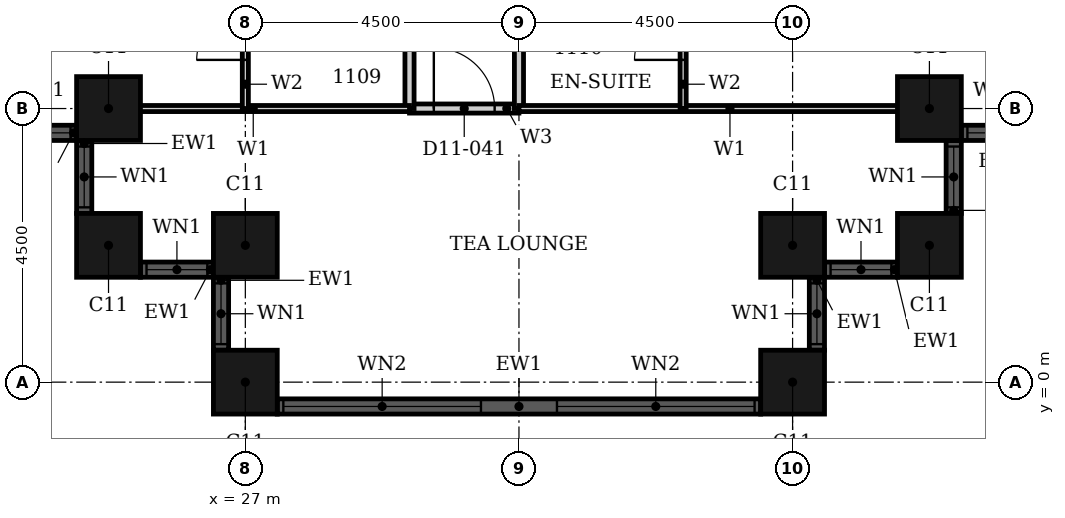
"""IFC4 building model, lengths in metres.
Left out: names, types, materials, properties, quantities, classifications, styles, units other than length and angle.
Written with IfcOpenShell. Run it as: python <this file> out.ifc"""

import sys

from ifc_helpers import new_model, si_unit, direction, frame, frame_2d, origin, origin_2d, place, context, subcontext, project, spatial, rectangle, hollow_rectangle, extrude, element, fill, save


model = new_model("IFC4")
c1 = context("Model", 3, precision=1e-05, world=origin(), true_north=direction((0.0, 1.0)))
c2 = subcontext(c1, "Body", "Model", "MODEL_VIEW")
j1 = project(units=[si_unit("LENGTHUNIT", "METRE"), si_unit("PLANEANGLEUNIT", "RADIAN")], contexts=[c1])
p1 = place(None, origin())
s1 = spatial("IfcSite", under=j1, at=p1, CompositionType="ELEMENT")
p2 = place(p1, origin())
s2 = spatial("IfcBuilding", under=s1, at=p2, CompositionType="ELEMENT")
p3 = place(p2, frame((0.0, 0.0, 52.8)))
s3 = spatial("IfcBuildingStorey", under=s2, at=p3, CompositionType="ELEMENT", Elevation=52.8)
for number, where, z_axis, x_axis in (
    (1, (24.75, 4.5, 0.0), (0.0, 0.0, 1.0), (1.0, 0.0, 0.0)),
    (2, (24.75, 2.25, 0.0), (0.0, 0.0, 1.0), (1.0, 0.0, 0.0)),
    (3, (27.0, 2.25, 0.0), (0.0, 0.0, 1.0), (1.0, 0.0, 0.0)),
    (4, (27.0, 0.0, 0.0), (0.0, 0.0, 1.0), (1.0, 0.0, 0.0)),
    (5, (36.0, 0.0, 0.0), (0.0, 0.0, 1.0), (1.0, 0.0, 0.0)),
    (6, (36.0, 2.25, 0.0), (0.0, 0.0, 1.0), (1.0, 0.0, 0.0)),
    (7, (38.25, 2.25, 0.0), (0.0, 0.0, 1.0), (1.0, 0.0, 0.0)),
    (8, (38.25, 4.5, 0.0), (0.0, 0.0, 1.0), (1.0, 0.0, 0.0)),
):
    element("IfcColumn", number, at=place(p3, frame(where, z_axis=z_axis, x_axis=x_axis)), inside=s3, PredefinedType="COLUMN", context=c2, shape_type="SweptSolid", body=[
        extrude(hollow_rectangle(XDim=1.05, YDim=1.05, WallThickness=0.034, at=origin_2d()), origin(), (0.0, 0.0, 1.0), 3.6),
    ])
p4 = place(p3, frame((23.025, 4.1, 0.0), z_axis=(0.0, 0.0, 1.0), x_axis=(1.0, 0.0, 0.0)))
e9 = element("IfcWall", 9, at=p4, inside=s3, PredefinedType="SOLIDWALL", context=c2, shape_type="SweptSolid", body=[
    extrude(rectangle(XDim=1.2, YDim=0.25, at=frame_2d((0.6, 0.0))), origin(), (0.0, 0.0, 1.0), 3.6),
])
p5 = place(p4, frame((0.1, 0.0, 0.9)))
e10 = element("IfcOpeningElement", 10, at=p5, cuts=e9, PredefinedType="OPENING", context=c2, shape_type="SweptSolid", body=[
    extrude(rectangle(XDim=1.0, YDim=2.08, at=frame_2d((0.5, 1.04))), frame((0.0, 0.135, 0.0), z_axis=(0.0, -1.0, 0.0), x_axis=(1.0, 0.0, 0.0)), (0.0, 0.0, 1.0), 0.27),
])
p6 = place(p3, frame((24.35, 3.975, 0.0), z_axis=(0.0, 0.0, 1.0), x_axis=(0.0, -1.0, 0.0)))
e11 = element("IfcWall", 11, at=p6, inside=s3, PredefinedType="SOLIDWALL", context=c2, shape_type="SweptSolid", body=[
    extrude(rectangle(XDim=1.2, YDim=0.25, at=frame_2d((0.6, 0.0))), origin(), (0.0, 0.0, 1.0), 3.6),
])
p7 = place(p6, frame((0.1, 0.0, 0.9)))
e12 = element("IfcOpeningElement", 12, at=p7, cuts=e11, PredefinedType="OPENING", context=c2, shape_type="SweptSolid", body=[
    extrude(rectangle(XDim=1.0, YDim=2.08, at=frame_2d((0.5, 1.04))), frame((0.0, 0.135, 0.0), z_axis=(0.0, -1.0, 0.0), x_axis=(1.0, 0.0, 0.0)), (0.0, 0.0, 1.0), 0.27),
])
p8 = place(p3, frame((25.275, 1.85, 0.0), z_axis=(0.0, 0.0, 1.0), x_axis=(1.0, 0.0, 0.0)))
e13 = element("IfcWall", 13, at=p8, inside=s3, PredefinedType="SOLIDWALL", context=c2, shape_type="SweptSolid", body=[
    extrude(rectangle(XDim=1.2, YDim=0.25, at=frame_2d((0.6, 0.0))), origin(), (0.0, 0.0, 1.0), 3.6),
])
p9 = place(p8, frame((0.1, 0.0, 0.9)))
e14 = element("IfcOpeningElement", 14, at=p9, cuts=e13, PredefinedType="OPENING", context=c2, shape_type="SweptSolid", body=[
    extrude(rectangle(XDim=1.0, YDim=2.08, at=frame_2d((0.5, 1.04))), frame((0.0, 0.135, 0.0), z_axis=(0.0, -1.0, 0.0), x_axis=(1.0, 0.0, 0.0)), (0.0, 0.0, 1.0), 0.27),
])
p10 = place(p3, frame((26.6, 1.725, 0.0), z_axis=(0.0, 0.0, 1.0), x_axis=(0.0, -1.0, 0.0)))
e15 = element("IfcWall", 15, at=p10, inside=s3, PredefinedType="SOLIDWALL", context=c2, shape_type="SweptSolid", body=[
    extrude(rectangle(XDim=1.2, YDim=0.25, at=frame_2d((0.6, 0.0))), origin(), (0.0, 0.0, 1.0), 3.6),
])
p11 = place(p10, frame((0.1, 0.0, 0.9)))
e16 = element("IfcOpeningElement", 16, at=p11, cuts=e15, PredefinedType="OPENING", context=c2, shape_type="SweptSolid", body=[
    extrude(rectangle(XDim=1.0, YDim=2.08, at=frame_2d((0.5, 1.04))), frame((0.0, 0.135, 0.0), z_axis=(0.0, -1.0, 0.0), x_axis=(1.0, 0.0, 0.0)), (0.0, 0.0, 1.0), 0.27),
])
p12 = place(p3, frame((27.525, -0.4, 0.0), z_axis=(0.0, 0.0, 1.0), x_axis=(1.0, 0.0, 0.0)))
e17 = element("IfcWall", 17, at=p12, inside=s3, PredefinedType="SOLIDWALL", context=c2, shape_type="SweptSolid", body=[
    extrude(rectangle(XDim=7.95, YDim=0.25, at=frame_2d((3.975, 0.0))), origin(), (0.0, 0.0, 1.0), 3.6),
])
p13 = place(p12, frame((0.1, 0.0, 0.9)))
e18 = element("IfcOpeningElement", 18, at=p13, cuts=e17, PredefinedType="OPENING", context=c2, shape_type="SweptSolid", body=[
    extrude(rectangle(XDim=3.25, YDim=2.08, at=frame_2d((1.625, 1.04))), frame((0.0, 0.135, 0.0), z_axis=(0.0, -1.0, 0.0), x_axis=(1.0, 0.0, 0.0)), (0.0, 0.0, 1.0), 0.27),
])
p14 = place(p12, frame((4.6, 0.0, 0.9)))
e19 = element("IfcOpeningElement", 19, at=p14, cuts=e17, PredefinedType="OPENING", context=c2, shape_type="SweptSolid", body=[
    extrude(rectangle(XDim=3.25, YDim=2.08, at=frame_2d((1.625, 1.04))), frame((0.0, 0.135, 0.0), z_axis=(0.0, -1.0, 0.0), x_axis=(1.0, 0.0, 0.0)), (0.0, 0.0, 1.0), 0.27),
])
p15 = place(p3, frame((36.4, 0.525, 0.0), z_axis=(0.0, 0.0, 1.0), x_axis=(0.0, 1.0, 0.0)))
e20 = element("IfcWall", 20, at=p15, inside=s3, PredefinedType="SOLIDWALL", context=c2, shape_type="SweptSolid", body=[
    extrude(rectangle(XDim=1.2, YDim=0.25, at=frame_2d((0.6, 0.0))), origin(), (0.0, 0.0, 1.0), 3.6),
])
p16 = place(p15, frame((0.1, 0.0, 0.9)))
e21 = element("IfcOpeningElement", 21, at=p16, cuts=e20, PredefinedType="OPENING", context=c2, shape_type="SweptSolid", body=[
    extrude(rectangle(XDim=1.0, YDim=2.08, at=frame_2d((0.5, 1.04))), frame((0.0, 0.135, 0.0), z_axis=(0.0, -1.0, 0.0), x_axis=(1.0, 0.0, 0.0)), (0.0, 0.0, 1.0), 0.27),
])
p17 = place(p3, frame((36.525, 1.85, 0.0), z_axis=(0.0, 0.0, 1.0), x_axis=(1.0, 0.0, 0.0)))
e22 = element("IfcWall", 22, at=p17, inside=s3, PredefinedType="SOLIDWALL", context=c2, shape_type="SweptSolid", body=[
    extrude(rectangle(XDim=1.2, YDim=0.25, at=frame_2d((0.6, 0.0))), origin(), (0.0, 0.0, 1.0), 3.6),
])
p18 = place(p17, frame((0.1, 0.0, 0.9)))
e23 = element("IfcOpeningElement", 23, at=p18, cuts=e22, PredefinedType="OPENING", context=c2, shape_type="SweptSolid", body=[
    extrude(rectangle(XDim=1.0, YDim=2.08, at=frame_2d((0.5, 1.04))), frame((0.0, 0.135, 0.0), z_axis=(0.0, -1.0, 0.0), x_axis=(1.0, 0.0, 0.0)), (0.0, 0.0, 1.0), 0.27),
])
p19 = place(p3, frame((38.65, 2.775, 0.0), z_axis=(0.0, 0.0, 1.0), x_axis=(0.0, 1.0, 0.0)))
e24 = element("IfcWall", 24, at=p19, inside=s3, PredefinedType="SOLIDWALL", context=c2, shape_type="SweptSolid", body=[
    extrude(rectangle(XDim=1.2, YDim=0.25, at=frame_2d((0.6, 0.0))), origin(), (0.0, 0.0, 1.0), 3.6),
])
p20 = place(p19, frame((0.1, 0.0, 0.9)))
e25 = element("IfcOpeningElement", 25, at=p20, cuts=e24, PredefinedType="OPENING", context=c2, shape_type="SweptSolid", body=[
    extrude(rectangle(XDim=1.0, YDim=2.08, at=frame_2d((0.5, 1.04))), frame((0.0, 0.135, 0.0), z_axis=(0.0, -1.0, 0.0), x_axis=(1.0, 0.0, 0.0)), (0.0, 0.0, 1.0), 0.27),
])
p21 = place(p3, frame((38.775, 4.1, 0.0), z_axis=(0.0, 0.0, 1.0), x_axis=(1.0, 0.0, 0.0)))
e26 = element("IfcWall", 26, at=p21, inside=s3, PredefinedType="SOLIDWALL", context=c2, shape_type="SweptSolid", body=[
    extrude(rectangle(XDim=1.2, YDim=0.25, at=frame_2d((0.6, 0.0))), origin(), (0.0, 0.0, 1.0), 3.6),
])
p22 = place(p21, frame((0.1, 0.0, 0.9)))
e27 = element("IfcOpeningElement", 27, at=p22, cuts=e26, PredefinedType="OPENING", context=c2, shape_type="SweptSolid", body=[
    extrude(rectangle(XDim=1.0, YDim=2.08, at=frame_2d((0.5, 1.04))), frame((0.0, 0.135, 0.0), z_axis=(0.0, -1.0, 0.0), x_axis=(1.0, 0.0, 0.0)), (0.0, 0.0, 1.0), 0.27),
])
p23 = place(p3, frame((29.7, 4.5, 0.0), z_axis=(0.0, 0.0, 1.0), x_axis=(1.0, 0.0, 0.0)))
e28 = element("IfcWall", 28, at=p23, inside=s3, PredefinedType="PARTITIONING", context=c2, shape_type="SweptSolid", body=[
    extrude(rectangle(XDim=1.8, YDim=0.15, at=frame_2d((0.9, 0.0))), origin(), (0.0, 0.0, 1.0), 3.3),
])
p24 = place(p23, frame((0.4, 0.0, 0.0)))
e29 = element("IfcOpeningElement", 29, at=p24, cuts=e28, PredefinedType="OPENING", context=c2, shape_type="SweptSolid", body=[
    extrude(rectangle(XDim=1.0, YDim=2.1, at=frame_2d((0.5, 1.05))), frame((0.0, 0.085, 0.0), z_axis=(0.0, -1.0, 0.0), x_axis=(1.0, 0.0, 0.0)), (0.0, 0.0, 1.0), 0.17),
])
p25 = place(p3, frame((29.7, 4.5, 0.0), z_axis=(0.0, 0.0, 1.0), x_axis=(0.0, 1.0, 0.0)))
e30 = element("IfcWall", 30, at=p25, inside=s3, PredefinedType="PARTITIONING", context=c2, shape_type="SweptSolid", body=[
    extrude(rectangle(XDim=16.2, YDim=0.15, at=frame_2d((8.1, 0.0))), origin(), (0.0, 0.0, 1.0), 3.3),
])
p26 = place(p25, frame((7.45, 0.0, 0.0)))
e31 = element("IfcOpeningElement", 31, at=p26, cuts=e30, PredefinedType="OPENING", context=c2, shape_type="SweptSolid", body=[
    extrude(rectangle(XDim=1.0, YDim=2.1, at=frame_2d((0.5, 1.05))), frame((0.0, 0.085, 0.0), z_axis=(0.0, -1.0, 0.0), x_axis=(1.0, 0.0, 0.0)), (0.0, 0.0, 1.0), 0.17),
])
p27 = place(p25, frame((2.95, 0.0, 0.0)))
e32 = element("IfcOpeningElement", 32, at=p27, cuts=e30, PredefinedType="OPENING", context=c2, shape_type="SweptSolid", body=[
    extrude(rectangle(XDim=1.0, YDim=2.1, at=frame_2d((0.5, 1.05))), frame((0.0, 0.085, 0.0), z_axis=(0.0, -1.0, 0.0), x_axis=(1.0, 0.0, 0.0)), (0.0, 0.0, 1.0), 0.17),
])
p28 = place(p3, frame((31.5, 4.5, 0.0), z_axis=(0.0, 0.0, 1.0), x_axis=(0.0, 1.0, 0.0)))
e33 = element("IfcWall", 33, at=p28, inside=s3, PredefinedType="PARTITIONING", context=c2, shape_type="SweptSolid", body=[
    extrude(rectangle(XDim=16.2, YDim=0.15, at=frame_2d((8.1, 0.0))), origin(), (0.0, 0.0, 1.0), 2.58),
])
p29 = place(p28, frame((6.25, 0.0, 0.0)))
e34 = element("IfcOpeningElement", 34, at=p29, cuts=e33, PredefinedType="OPENING", context=c2, shape_type="SweptSolid", body=[
    extrude(rectangle(XDim=1.0, YDim=2.1, at=frame_2d((0.5, 1.05))), frame((0.0, 0.085, 0.0), z_axis=(0.0, -1.0, 0.0), x_axis=(1.0, 0.0, 0.0)), (0.0, 0.0, 1.0), 0.17),
])
p30 = place(p3, frame((24.56, 4.5, 0.0), z_axis=(0.0, 0.0, 1.0), x_axis=(1.0, 0.0, 0.0)))
e35 = element("IfcWall", 35, at=p30, inside=s3, PredefinedType="PARTITIONING", context=c2, shape_type="SweptSolid", body=[
    extrude(rectangle(XDim=5.14, YDim=0.1, at=frame_2d((2.57, 0.0))), origin(), (0.0, 0.0, 1.0), 3.3),
])
p31 = place(p3, frame((31.5, 4.5, 0.0), z_axis=(0.0, 0.0, 1.0), x_axis=(1.0, 0.0, 0.0)))
e36 = element("IfcWall", 36, at=p31, inside=s3, PredefinedType="PARTITIONING", context=c2, shape_type="SweptSolid", body=[
    extrude(rectangle(XDim=6.94, YDim=0.1, at=frame_2d((3.47, 0.0))), origin(), (0.0, 0.0, 1.0), 3.3),
])
p32 = place(p3, frame((27.0, 4.5, 0.0), z_axis=(0.0, 0.0, 1.0), x_axis=(0.0, 1.0, 0.0)))
e37 = element("IfcWall", 37, at=p32, inside=s3, PredefinedType="PARTITIONING", context=c2, shape_type="SweptSolid", body=[
    extrude(rectangle(XDim=2.4, YDim=0.1, at=frame_2d((1.2, 0.0))), origin(), (0.0, 0.0, 1.0), 2.58),
])
p33 = place(p32, frame((0.8, 0.0, 0.0)))
e38 = element("IfcOpeningElement", 38, at=p33, cuts=e37, PredefinedType="OPENING", context=c2, shape_type="SweptSolid", body=[
    extrude(rectangle(XDim=0.8, YDim=2.1, at=frame_2d((0.4, 1.05))), frame((0.0, 0.06, 0.0), z_axis=(0.0, -1.0, 0.0), x_axis=(1.0, 0.0, 0.0)), (0.0, 0.0, 1.0), 0.12),
])
p34 = place(p3, frame((34.2, 4.5, 0.0), z_axis=(0.0, 0.0, 1.0), x_axis=(0.0, 1.0, 0.0)))
e39 = element("IfcWall", 39, at=p34, inside=s3, PredefinedType="PARTITIONING", context=c2, shape_type="SweptSolid", body=[
    extrude(rectangle(XDim=2.4, YDim=0.1, at=frame_2d((1.2, 0.0))), origin(), (0.0, 0.0, 1.0), 3.3),
])
p35 = place(p34, frame((0.8, 0.0, 0.0)))
e40 = element("IfcOpeningElement", 40, at=p35, cuts=e39, PredefinedType="OPENING", context=c2, shape_type="SweptSolid", body=[
    extrude(rectangle(XDim=0.8, YDim=2.1, at=frame_2d((0.4, 1.05))), frame((0.0, 0.06, 0.0), z_axis=(0.0, -1.0, 0.0), x_axis=(1.0, 0.0, 0.0)), (0.0, 0.0, 1.0), 0.12),
])
p36 = place(p5, origin())
e41 = element("IfcWindow", 41, at=p36, inside=s3, PartitioningType="SINGLE_PANEL", PredefinedType="WINDOW", context=c2, shape_type="SweptSolid", body=[
    extrude(rectangle(XDim=1.0, YDim=2.08, at=frame_2d((0.5, 1.04))), frame((0.0, 0.03, 0.0), z_axis=(0.0, -1.0, 0.0), x_axis=(1.0, 0.0, 0.0)), (0.0, 0.0, 1.0), 0.06),
])
fill(e10, e41)
p37 = place(p7, origin())
e42 = element("IfcWindow", 42, at=p37, inside=s3, PartitioningType="SINGLE_PANEL", PredefinedType="WINDOW", context=c2, shape_type="SweptSolid", body=[
    extrude(rectangle(XDim=1.0, YDim=2.08, at=frame_2d((0.5, 1.04))), frame((0.0, 0.03, 0.0), z_axis=(0.0, -1.0, 0.0), x_axis=(1.0, 0.0, 0.0)), (0.0, 0.0, 1.0), 0.06),
])
fill(e12, e42)
p38 = place(p9, origin())
e43 = element("IfcWindow", 43, at=p38, inside=s3, PartitioningType="SINGLE_PANEL", PredefinedType="WINDOW", context=c2, shape_type="SweptSolid", body=[
    extrude(rectangle(XDim=1.0, YDim=2.08, at=frame_2d((0.5, 1.04))), frame((0.0, 0.03, 0.0), z_axis=(0.0, -1.0, 0.0), x_axis=(1.0, 0.0, 0.0)), (0.0, 0.0, 1.0), 0.06),
])
fill(e14, e43)
p39 = place(p11, origin())
e44 = element("IfcWindow", 44, at=p39, inside=s3, PartitioningType="SINGLE_PANEL", PredefinedType="WINDOW", context=c2, shape_type="SweptSolid", body=[
    extrude(rectangle(XDim=1.0, YDim=2.08, at=frame_2d((0.5, 1.04))), frame((0.0, 0.03, 0.0), z_axis=(0.0, -1.0, 0.0), x_axis=(1.0, 0.0, 0.0)), (0.0, 0.0, 1.0), 0.06),
])
fill(e16, e44)
p40 = place(p13, origin())
e45 = element("IfcWindow", 45, at=p40, inside=s3, PartitioningType="SINGLE_PANEL", PredefinedType="WINDOW", context=c2, shape_type="SweptSolid", body=[
    extrude(rectangle(XDim=3.25, YDim=2.08, at=frame_2d((1.625, 1.04))), frame((0.0, 0.03, 0.0), z_axis=(0.0, -1.0, 0.0), x_axis=(1.0, 0.0, 0.0)), (0.0, 0.0, 1.0), 0.06),
])
fill(e18, e45)
p41 = place(p14, origin())
e46 = element("IfcWindow", 46, at=p41, inside=s3, PartitioningType="SINGLE_PANEL", PredefinedType="WINDOW", context=c2, shape_type="SweptSolid", body=[
    extrude(rectangle(XDim=3.25, YDim=2.08, at=frame_2d((1.625, 1.04))), frame((0.0, 0.03, 0.0), z_axis=(0.0, -1.0, 0.0), x_axis=(1.0, 0.0, 0.0)), (0.0, 0.0, 1.0), 0.06),
])
fill(e19, e46)
p42 = place(p16, origin())
e47 = element("IfcWindow", 47, at=p42, inside=s3, PartitioningType="SINGLE_PANEL", PredefinedType="WINDOW", context=c2, shape_type="SweptSolid", body=[
    extrude(rectangle(XDim=1.0, YDim=2.08, at=frame_2d((0.5, 1.04))), frame((0.0, 0.03, 0.0), z_axis=(0.0, -1.0, 0.0), x_axis=(1.0, 0.0, 0.0)), (0.0, 0.0, 1.0), 0.06),
])
fill(e21, e47)
p43 = place(p18, origin())
e48 = element("IfcWindow", 48, at=p43, inside=s3, PartitioningType="SINGLE_PANEL", PredefinedType="WINDOW", context=c2, shape_type="SweptSolid", body=[
    extrude(rectangle(XDim=1.0, YDim=2.08, at=frame_2d((0.5, 1.04))), frame((0.0, 0.03, 0.0), z_axis=(0.0, -1.0, 0.0), x_axis=(1.0, 0.0, 0.0)), (0.0, 0.0, 1.0), 0.06),
])
fill(e23, e48)
p44 = place(p20, origin())
e49 = element("IfcWindow", 49, at=p44, inside=s3, PartitioningType="SINGLE_PANEL", PredefinedType="WINDOW", context=c2, shape_type="SweptSolid", body=[
    extrude(rectangle(XDim=1.0, YDim=2.08, at=frame_2d((0.5, 1.04))), frame((0.0, 0.03, 0.0), z_axis=(0.0, -1.0, 0.0), x_axis=(1.0, 0.0, 0.0)), (0.0, 0.0, 1.0), 0.06),
])
fill(e25, e49)
p45 = place(p22, origin())
e50 = element("IfcWindow", 50, at=p45, inside=s3, PartitioningType="SINGLE_PANEL", PredefinedType="WINDOW", context=c2, shape_type="SweptSolid", body=[
    extrude(rectangle(XDim=1.0, YDim=2.08, at=frame_2d((0.5, 1.04))), frame((0.0, 0.03, 0.0), z_axis=(0.0, -1.0, 0.0), x_axis=(1.0, 0.0, 0.0)), (0.0, 0.0, 1.0), 0.06),
])
fill(e27, e50)
p46 = place(p33, origin())
e51 = element("IfcDoor", 51, at=p46, inside=s3, OperationType="SINGLE_SWING_LEFT", PredefinedType="DOOR", context=c2, shape_type="SweptSolid", body=[
    extrude(rectangle(XDim=0.8, YDim=2.1, at=frame_2d((0.4, 1.05))), frame((0.0, 0.025, 0.0), z_axis=(0.0, -1.0, 0.0), x_axis=(1.0, 0.0, 0.0)), (0.0, 0.0, 1.0), 0.05),
])
fill(e38, e51)
p47 = place(p35, origin())
e52 = element("IfcDoor", 52, at=p47, inside=s3, OperationType="SINGLE_SWING_LEFT", PredefinedType="DOOR", context=c2, shape_type="SweptSolid", body=[
    extrude(rectangle(XDim=0.8, YDim=2.1, at=frame_2d((0.4, 1.05))), frame((0.0, 0.025, 0.0), z_axis=(0.0, -1.0, 0.0), x_axis=(1.0, 0.0, 0.0)), (0.0, 0.0, 1.0), 0.05),
])
fill(e40, e52)
p48 = place(p24, origin())
e53 = element("IfcDoor", 53, at=p48, inside=s3, OperationType="SINGLE_SWING_LEFT", PredefinedType="DOOR", context=c2, shape_type="SweptSolid", body=[
    extrude(rectangle(XDim=1.0, YDim=2.1, at=frame_2d((0.5, 1.05))), frame((0.0, 0.025, 0.0), z_axis=(0.0, -1.0, 0.0), x_axis=(1.0, 0.0, 0.0)), (0.0, 0.0, 1.0), 0.05),
])
fill(e29, e53)
save(model, sys.argv[1])
